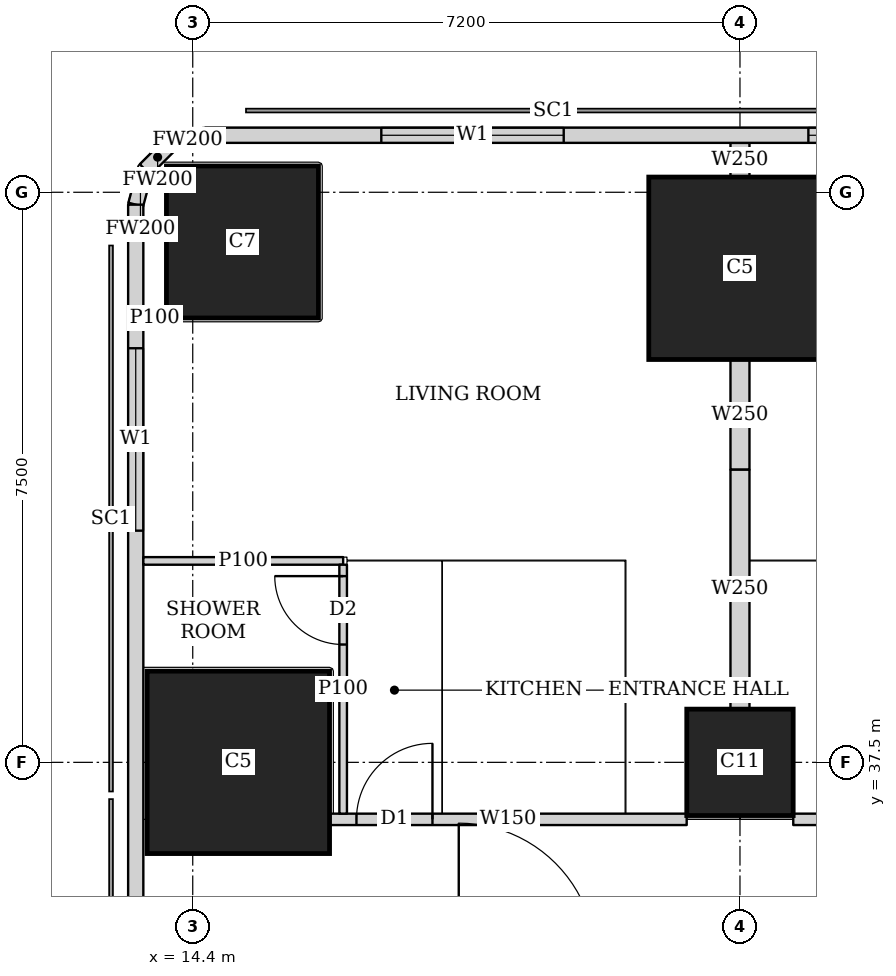
"""IFC4 building model, lengths in metres.
Left out: names, types, materials, properties, quantities, classifications, styles, units other than length and angle.
Written with IfcOpenShell. Run it as: python <this file> out.ifc"""

import sys

from ifc_helpers import new_model, si_unit, direction, frame, frame_2d, origin, origin_2d, place, context, subcontext, project, spatial, rectangle, extrude, element, fill, save


model = new_model("IFC4")
c1 = context("Model", 3, precision=1e-05, world=origin(), true_north=direction((0.0, 1.0)))
c2 = subcontext(c1, "Body", "Model", "MODEL_VIEW")
j1 = project(units=[si_unit("LENGTHUNIT", "METRE"), si_unit("PLANEANGLEUNIT", "RADIAN")], contexts=[c1])
p1 = place(None, origin())
s1 = spatial("IfcSite", under=j1, at=p1, CompositionType="ELEMENT")
p2 = place(p1, origin())
s2 = spatial("IfcBuilding", under=s1, at=p2, CompositionType="ELEMENT")
p3 = place(p2, frame((0.0, 0.0, 242.45)))
s3 = spatial("IfcBuildingStorey", under=s2, at=p3, CompositionType="ELEMENT", Elevation=242.45)
p4 = place(p3, frame((15.0, 37.5, 0.0), z_axis=(0.0, 0.0, 1.0), x_axis=(1.0, 0.0, 0.0)))
e1 = element("IfcColumn", 1, at=p4, inside=s3, PredefinedType="COLUMN", context=c2, shape_type="SweptSolid", body=[
    extrude(rectangle(XDim=2.4, YDim=2.4, at=origin_2d()), origin(), (0.0, 0.0, 1.0), 3.75),
])
p5 = place(p3, frame((21.6, 37.5, 0.0), z_axis=(0.0, 0.0, 1.0), x_axis=(1.0, 0.0, 0.0)))
e2 = element("IfcColumn", 2, at=p5, inside=s3, PredefinedType="COLUMN", context=c2, shape_type="SweptSolid", body=[
    extrude(rectangle(XDim=1.4, YDim=1.4, at=origin_2d()), origin(), (0.0, 0.0, 1.0), 3.75),
])
p6 = place(p3, frame((15.054, 44.346, 0.0), z_axis=(0.0, 0.0, 1.0), x_axis=(1.0, 0.0, 0.0)))
e3 = element("IfcColumn", 3, at=p6, inside=s3, PredefinedType="COLUMN", context=c2, shape_type="SweptSolid", body=[
    extrude(rectangle(XDim=2.0, YDim=2.0, at=origin_2d()), origin(), (0.0, 0.0, 1.0), 3.75),
])
p7 = place(p3, frame((21.6, 44.0, 0.0), z_axis=(0.0, 0.0, 1.0), x_axis=(1.0, 0.0, 0.0)))
e4 = element("IfcColumn", 4, at=p7, inside=s3, PredefinedType="COLUMN", context=c2, shape_type="SweptSolid", body=[
    extrude(rectangle(XDim=2.4, YDim=2.4, at=origin_2d()), origin(), (0.0, 0.0, 1.0), 3.75),
])
p8 = place(p3, frame((40.106, 45.75, 0.0), z_axis=(0.0, 0.0, 1.0), x_axis=(-1.0, 0.0, 0.0)))
e5 = element("IfcWall", 5, at=p8, inside=s3, PredefinedType="SOLIDWALL", context=c2, shape_type="SweptSolid", body=[
    extrude(rectangle(XDim=25.543, YDim=0.2, at=frame_2d((12.771, 0.0))), origin(), (0.0, 0.0, 1.0), 3.45),
])
p9 = place(p8, frame((8.606, 0.0, 0.9)))
e6 = element("IfcOpeningElement", 6, at=p9, cuts=e5, PredefinedType="OPENING", context=c2, shape_type="SweptSolid", body=[
    extrude(rectangle(XDim=1.8, YDim=1.5, at=frame_2d((0.9, 0.75))), frame((0.0, 0.11, 0.0), z_axis=(0.0, -1.0, 0.0), x_axis=(1.0, 0.0, 0.0)), (0.0, 0.0, 1.0), 0.22),
])
p10 = place(p8, frame((12.206, 0.0, 0.9)))
e7 = element("IfcOpeningElement", 7, at=p10, cuts=e5, PredefinedType="OPENING", context=c2, shape_type="SweptSolid", body=[
    extrude(rectangle(XDim=1.8, YDim=1.5, at=frame_2d((0.9, 0.75))), frame((0.0, 0.11, 0.0), z_axis=(0.0, -1.0, 0.0), x_axis=(1.0, 0.0, 0.0)), (0.0, 0.0, 1.0), 0.22),
])
p11 = place(p8, frame((15.806, 0.0, 0.9)))
e8 = element("IfcOpeningElement", 8, at=p11, cuts=e5, PredefinedType="OPENING", context=c2, shape_type="SweptSolid", body=[
    extrude(rectangle(XDim=1.8, YDim=1.5, at=frame_2d((0.9, 0.75))), frame((0.0, 0.11, 0.0), z_axis=(0.0, -1.0, 0.0), x_axis=(1.0, 0.0, 0.0)), (0.0, 0.0, 1.0), 0.22),
])
p12 = place(p8, frame((20.825, 0.0, 0.9)))
e9 = element("IfcOpeningElement", 9, at=p12, cuts=e5, PredefinedType="OPENING", context=c2, shape_type="SweptSolid", body=[
    extrude(rectangle(XDim=2.4, YDim=1.5, at=frame_2d((1.2, 0.75))), frame((0.0, 0.11, 0.0), z_axis=(0.0, -1.0, 0.0), x_axis=(1.0, 0.0, 0.0)), (0.0, 0.0, 1.0), 0.22),
])
p13 = place(p3, frame((14.563, 45.75, 0.0), z_axis=(0.0, 0.0, 1.0), x_axis=(-0.965655254015, -0.259826731483, 0.0)))
e10 = element("IfcWall", 10, at=p13, inside=s3, PredefinedType="SOLIDWALL", context=c2, shape_type="SweptSolid", body=[
    extrude(rectangle(XDim=0.477, YDim=0.2, at=frame_2d((0.239, 0.0))), origin(), (0.0, 0.0, 1.0), 3.45),
])
p14 = place(p3, frame((14.102, 45.626, 0.0), z_axis=(0.0, 0.0, 1.0), x_axis=(-0.707369890659, -0.706843573776, 0.0)))
e11 = element("IfcWall", 11, at=p14, inside=s3, PredefinedType="SOLIDWALL", context=c2, shape_type="SweptSolid", body=[
    extrude(rectangle(XDim=0.464, YDim=0.2, at=frame_2d((0.232, 0.0))), origin(), (0.0, 0.0, 1.0), 3.45),
])
p15 = place(p3, frame((13.774, 45.298, 0.0), z_axis=(0.0, 0.0, 1.0), x_axis=(-0.259698463175, -0.965689757751, 0.0)))
e12 = element("IfcWall", 12, at=p15, inside=s3, PredefinedType="SOLIDWALL", context=c2, shape_type="SweptSolid", body=[
    extrude(rectangle(XDim=0.478, YDim=0.2, at=frame_2d((0.239, 0.0))), origin(), (0.0, 0.0, 1.0), 3.45),
])
p16 = place(p3, frame((13.65, 44.837, 0.0), z_axis=(0.0, 0.0, 1.0), x_axis=(0.0, -1.0, 0.0)))
e13 = element("IfcWall", 13, at=p16, inside=s3, PredefinedType="SOLIDWALL", context=c2, shape_type="SweptSolid", body=[
    extrude(rectangle(XDim=44.674, YDim=0.2, at=frame_2d((22.337, 0.0))), origin(), (0.0, 0.0, 1.0), 3.45),
])
p17 = place(p16, frame((1.889, 0.0, 0.9)))
e14 = element("IfcOpeningElement", 14, at=p17, cuts=e13, PredefinedType="OPENING", context=c2, shape_type="SweptSolid", body=[
    extrude(rectangle(XDim=2.4, YDim=1.5, at=frame_2d((1.2, 0.75))), frame((0.0, 0.11, 0.0), z_axis=(0.0, -1.0, 0.0), x_axis=(1.0, 0.0, 0.0)), (0.0, 0.0, 1.0), 0.22),
])
p18 = place(p16, frame((40.385, 0.0, 0.9)))
e15 = element("IfcOpeningElement", 15, at=p18, cuts=e13, PredefinedType="OPENING", context=c2, shape_type="SweptSolid", body=[
    extrude(rectangle(XDim=2.4, YDim=1.5, at=frame_2d((1.2, 0.75))), frame((0.0, 0.11, 0.0), z_axis=(0.0, -1.0, 0.0), x_axis=(1.0, 0.0, 0.0)), (0.0, 0.0, 1.0), 0.22),
])
p19 = place(p3, frame((16.201, 36.75, 0.0), z_axis=(0.0, 0.0, 1.0), x_axis=(1.0, 0.0, 0.0)))
e16 = element("IfcWall", 16, at=p19, inside=s3, PredefinedType="SOLIDWALL", context=c2, shape_type="SweptSolid", body=[
    extrude(rectangle(XDim=4.698, YDim=0.15, at=frame_2d((2.349, 0.0))), origin(), (0.0, 0.0, 1.0), 3.45),
])
p20 = place(p19, frame((0.353, 0.0, 0.0)))
e17 = element("IfcOpeningElement", 17, at=p20, cuts=e16, PredefinedType="OPENING", context=c2, shape_type="SweptSolid", body=[
    extrude(rectangle(XDim=1.0, YDim=2.1, at=frame_2d((0.5, 1.05))), frame((0.0, 0.085, 0.0), z_axis=(0.0, -1.0, 0.0), x_axis=(1.0, 0.0, 0.0)), (0.0, 0.0, 1.0), 0.17),
])
p21 = place(p3, frame((22.301, 36.75, 0.0), z_axis=(0.0, 0.0, 1.0), x_axis=(1.0, 0.0, 0.0)))
e18 = element("IfcWall", 18, at=p21, inside=s3, PredefinedType="SOLIDWALL", context=c2, shape_type="SweptSolid", body=[
    extrude(rectangle(XDim=5.798, YDim=0.15, at=frame_2d((2.899, 0.0))), origin(), (0.0, 0.0, 1.0), 3.45),
])
p22 = place(p21, frame((0.799, 0.0, 0.0)))
e19 = element("IfcOpeningElement", 19, at=p22, cuts=e18, PredefinedType="OPENING", context=c2, shape_type="SweptSolid", body=[
    extrude(rectangle(XDim=1.0, YDim=2.1, at=frame_2d((0.5, 1.05))), frame((0.0, 0.085, 0.0), z_axis=(0.0, -1.0, 0.0), x_axis=(1.0, 0.0, 0.0)), (0.0, 0.0, 1.0), 0.17),
])
p23 = place(p3, frame((14.054, 43.346, 0.0), z_axis=(0.0, 0.0, 1.0), x_axis=(-1.0, 0.0, 0.0)))
e20 = element("IfcWall", 20, at=p23, inside=s3, PredefinedType="PARTITIONING", context=c2, shape_type="SweptSolid", body=[
    extrude(rectangle(XDim=0.304, YDim=0.1, at=frame_2d((0.152, 0.0))), origin(), (0.0, 0.0, 1.0), 2.0),
])
p24 = place(p3, frame((13.75, 40.15, 0.0), z_axis=(0.0, 0.0, 1.0), x_axis=(1.0, 0.0, 0.0)))
e21 = element("IfcWall", 21, at=p24, inside=s3, PredefinedType="PARTITIONING", context=c2, shape_type="SweptSolid", body=[
    extrude(rectangle(XDim=2.629, YDim=0.1, at=frame_2d((1.314, 0.0))), origin(), (0.0, 0.0, 1.0), 2.0),
])
p25 = place(p3, frame((16.379, 36.825, 0.0), z_axis=(0.0, 0.0, 1.0), x_axis=(0.0, 1.0, 0.0)))
e22 = element("IfcWall", 22, at=p25, inside=s3, PredefinedType="PARTITIONING", context=c2, shape_type="SweptSolid", body=[
    extrude(rectangle(XDim=3.275, YDim=0.1, at=frame_2d((1.638, 0.0))), origin(), (0.0, 0.0, 1.0), 3.45),
])
p26 = place(p25, frame((2.225, 0.0, 0.0)))
e23 = element("IfcOpeningElement", 23, at=p26, cuts=e22, PredefinedType="OPENING", context=c2, shape_type="SweptSolid", body=[
    extrude(rectangle(XDim=0.9, YDim=2.1, at=frame_2d((0.45, 1.05))), frame((0.0, 0.06, 0.0), z_axis=(0.0, -1.0, 0.0), x_axis=(1.0, 0.0, 0.0)), (0.0, 0.0, 1.0), 0.12),
])
p27 = place(p3, frame((21.6, 41.35, 0.0), z_axis=(0.0, 0.0, 1.0), x_axis=(0.0, 1.0, 0.0)))
e24 = element("IfcWall", 24, at=p27, inside=s3, PredefinedType="SOLIDWALL", context=c2, shape_type="SweptSolid", body=[
    extrude(rectangle(XDim=1.449, YDim=0.25, at=frame_2d((0.725, 0.0))), origin(), (0.0, 0.0, 1.0), 2.0),
])
p28 = place(p3, frame((21.6, 45.201, 0.0), z_axis=(0.0, 0.0, 1.0), x_axis=(0.0, 1.0, 0.0)))
e25 = element("IfcWall", 25, at=p28, inside=s3, PredefinedType="SOLIDWALL", context=c2, shape_type="SweptSolid", body=[
    extrude(rectangle(XDim=0.449, YDim=0.25, at=frame_2d((0.225, 0.0))), origin(), (0.0, 0.0, 1.0), 2.0),
])
p29 = place(p3, frame((21.6, 38.201, 0.0), z_axis=(0.0, 0.0, 1.0), x_axis=(0.0, 1.0, 0.0)))
e26 = element("IfcWall", 26, at=p29, inside=s3, PredefinedType="SOLIDWALL", context=c2, shape_type="SweptSolid", body=[
    extrude(rectangle(XDim=3.149, YDim=0.25, at=frame_2d((1.575, 0.0))), origin(), (0.0, 0.0, 1.0), 3.45),
])
p30 = place(p11, origin())
e27 = element("IfcWindow", 27, at=p30, inside=s3, PartitioningType="SINGLE_PANEL", PredefinedType="WINDOW", context=c2, shape_type="SweptSolid", body=[
    extrude(rectangle(XDim=1.8, YDim=1.5, at=frame_2d((0.9, 0.75))), frame((0.0, 0.03, 0.0), z_axis=(0.0, -1.0, 0.0), x_axis=(1.0, 0.0, 0.0)), (0.0, 0.0, 1.0), 0.06),
])
fill(e8, e27)
p31 = place(p12, origin())
e28 = element("IfcWindow", 28, at=p31, inside=s3, PartitioningType="SINGLE_PANEL", PredefinedType="WINDOW", context=c2, shape_type="SweptSolid", body=[
    extrude(rectangle(XDim=2.4, YDim=1.5, at=frame_2d((1.2, 0.75))), frame((0.0, 0.03, 0.0), z_axis=(0.0, -1.0, 0.0), x_axis=(1.0, 0.0, 0.0)), (0.0, 0.0, 1.0), 0.06),
])
fill(e9, e28)
p32 = place(p17, origin())
e29 = element("IfcWindow", 29, at=p32, inside=s3, PartitioningType="SINGLE_PANEL", PredefinedType="WINDOW", context=c2, shape_type="SweptSolid", body=[
    extrude(rectangle(XDim=2.4, YDim=1.5, at=frame_2d((1.2, 0.75))), frame((0.0, 0.03, 0.0), z_axis=(0.0, -1.0, 0.0), x_axis=(1.0, 0.0, 0.0)), (0.0, 0.0, 1.0), 0.06),
])
fill(e14, e29)
p33 = place(p26, origin())
e30 = element("IfcDoor", 30, at=p33, inside=s3, OperationType="SINGLE_SWING_RIGHT", PredefinedType="DOOR", context=c2, shape_type="SweptSolid", body=[
    extrude(rectangle(XDim=0.9, YDim=2.1, at=frame_2d((0.45, 1.05))), frame((0.0, 0.025, 0.0), z_axis=(0.0, -1.0, 0.0), x_axis=(1.0, 0.0, 0.0)), (0.0, 0.0, 1.0), 0.05),
])
fill(e23, e30)
p34 = place(p20, origin())
e31 = element("IfcDoor", 31, at=p34, inside=s3, OperationType="SINGLE_SWING_RIGHT", PredefinedType="DOOR", context=c2, shape_type="SweptSolid", body=[
    extrude(rectangle(XDim=1.0, YDim=2.1, at=frame_2d((0.5, 1.05))), frame((0.0, 0.025, 0.0), z_axis=(0.0, -1.0, 0.0), x_axis=(1.0, 0.0, 0.0)), (0.0, 0.0, 1.0), 0.05),
])
fill(e17, e31)
save(model, sys.argv[1])
